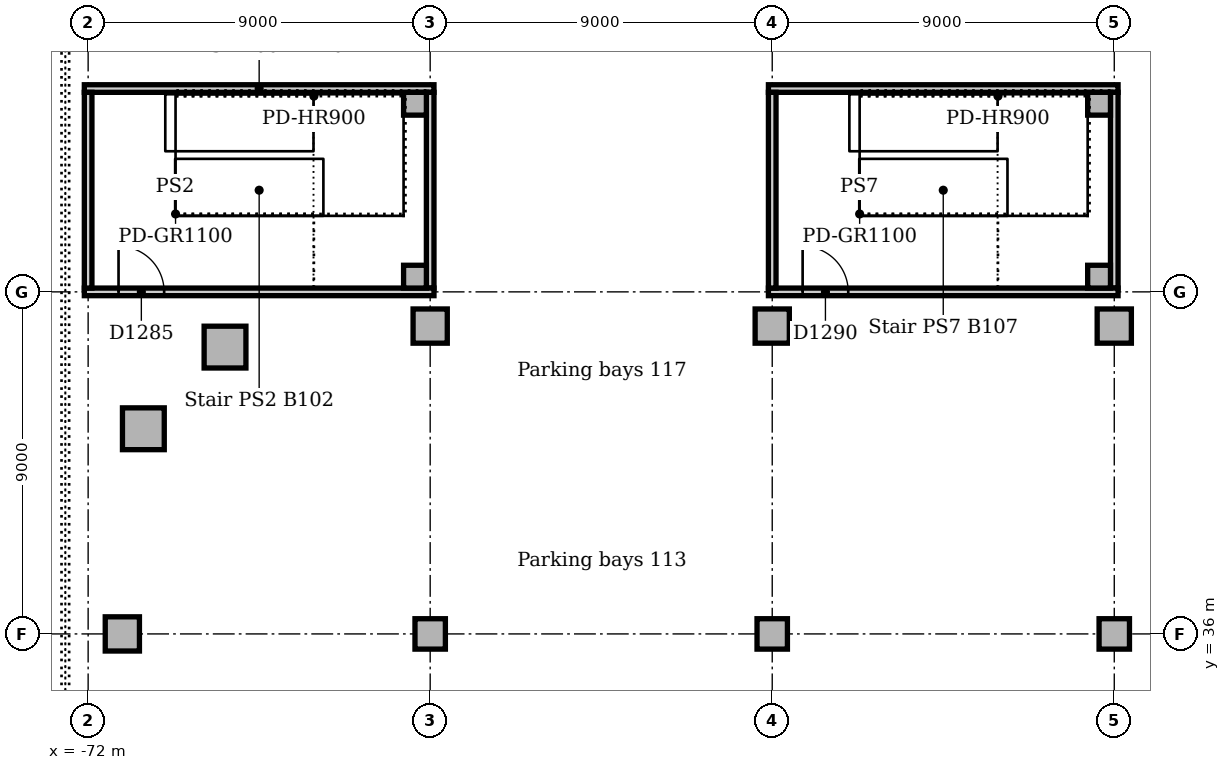
"""IFC4 building model, lengths in metres.
Left out: names, types, materials, properties, quantities, classifications, styles, units other than length and angle.
Written with IfcOpenShell. Run it as: python <this file> out.ifc"""

import sys

from ifc_helpers import new_model, si_unit, direction, frame, frame_2d, origin, origin_2d, place, context, subcontext, project, spatial, rectangle, extrude, element, fill, save


model = new_model("IFC4")
c1 = context("Model", 3, precision=1e-05, world=origin(), true_north=direction((0.0, 1.0)))
c2 = subcontext(c1, "Body", "Model", "MODEL_VIEW")
j1 = project(units=[si_unit("LENGTHUNIT", "METRE"), si_unit("PLANEANGLEUNIT", "RADIAN")], contexts=[c1])
p1 = place(None, origin())
s1 = spatial("IfcSite", under=j1, at=p1, CompositionType="ELEMENT")
p2 = place(p1, origin())
s2 = spatial("IfcBuilding", under=s1, at=p2, CompositionType="ELEMENT")
p3 = place(p2, frame((0.0, 0.0, -5.0)))
s3 = spatial("IfcBuildingStorey", under=s2, at=p3, CompositionType="ELEMENT", Elevation=-5.0)
for number, where, z_axis, x_axis in (
    (1, (-68.398, 43.547, 0.0), (0.0, 0.0, 1.0), (1.0, 0.0, 0.0)),
    (2, (-70.547, 41.398, 0.0), (0.0, 0.0, 1.0), (1.0, 0.0, 0.0)),
):
    element("IfcColumn", number, at=place(p3, frame(where, z_axis=z_axis, x_axis=x_axis)), inside=s3, PredefinedType="COLUMN", context=c2, shape_type="SweptSolid", body=[
        extrude(rectangle(XDim=1.1, YDim=1.1, at=origin_2d()), origin(), (0.0, 0.0, 1.0), 4.7),
    ])
for number, where, z_axis, x_axis in (
    (3, (-63.0, 44.1, 0.0), (0.0, 0.0, 1.0), (1.0, 0.0, 0.0)),
    (4, (-54.0, 44.1, 0.0), (0.0, 0.0, 1.0), (1.0, 0.0, 0.0)),
    (5, (-45.0, 44.1, 0.0), (0.0, 0.0, 1.0), (1.0, 0.0, 0.0)),
    (6, (-71.1, 36.0, 0.0), (0.0, 0.0, 1.0), (1.0, 0.0, 0.0)),
):
    element("IfcColumn", number, at=place(p3, frame(where, z_axis=z_axis, x_axis=x_axis)), inside=s3, PredefinedType="COLUMN", context=c2, shape_type="SweptSolid", body=[
        extrude(rectangle(XDim=0.9, YDim=0.9, at=origin_2d()), origin(), (0.0, 0.0, 1.0), 4.7),
    ])
for number, where, z_axis, x_axis in (
    (7, (-63.0, 36.0, 0.0), (0.0, 0.0, 1.0), (1.0, 0.0, 0.0)),
    (8, (-54.0, 36.0, 0.0), (0.0, 0.0, 1.0), (1.0, 0.0, 0.0)),
    (9, (-45.0, 36.0, 0.0), (0.0, 0.0, 1.0), (1.0, 0.0, 0.0)),
):
    element("IfcColumn", number, at=place(p3, frame(where, z_axis=z_axis, x_axis=x_axis)), inside=s3, PredefinedType="COLUMN", context=c2, shape_type="SweptSolid", body=[
        extrude(rectangle(XDim=0.8, YDim=0.8, at=origin_2d()), origin(), (0.0, 0.0, 1.0), 4.7),
    ])
for number, where, z_axis, x_axis in (
    (10, (-63.4, 49.95, 0.0), (0.0, 0.0, 1.0), (1.0, 0.0, 0.0)),
    (11, (-63.4, 45.4, 0.0), (0.0, 0.0, 1.0), (1.0, 0.0, 0.0)),
    (12, (-45.4, 49.95, 0.0), (0.0, 0.0, 1.0), (1.0, 0.0, 0.0)),
    (13, (-45.4, 45.4, 0.0), (0.0, 0.0, 1.0), (1.0, 0.0, 0.0)),
):
    element("IfcColumn", number, at=place(p3, frame(where, z_axis=z_axis, x_axis=x_axis)), inside=s3, PredefinedType="COLUMN", context=c2, shape_type="SweptSolid", body=[
        extrude(rectangle(XDim=0.6, YDim=0.6, at=origin_2d()), origin(), (0.0, 0.0, 1.0), 5.0),
    ])
p4 = place(p3, frame((-72.1, 50.35, 0.0), z_axis=(0.0, 0.0, 1.0), x_axis=(1.0, 0.0, 0.0)))
e14 = element("IfcWall", 14, at=p4, inside=s3, PredefinedType="SOLIDWALL", context=c2, shape_type="SweptSolid", body=[
    extrude(rectangle(XDim=9.2, YDim=0.2, at=frame_2d((4.6, 0.0))), origin(), (0.0, 0.0, 1.0), 4.7),
])
p5 = place(p3, frame((-63.0, 45.1, 0.0), z_axis=(0.0, 0.0, 1.0), x_axis=(0.0, 1.0, 0.0)))
e15 = element("IfcWall", 15, at=p5, inside=s3, PredefinedType="SOLIDWALL", context=c2, shape_type="SweptSolid", body=[
    extrude(rectangle(XDim=5.15, YDim=0.2, at=frame_2d((2.575, 0.0))), origin(), (0.0, 0.0, 1.0), 4.7),
])
p6 = place(p3, frame((-72.1, 45.0, 0.0), z_axis=(0.0, 0.0, 1.0), x_axis=(1.0, 0.0, 0.0)))
e16 = element("IfcWall", 16, at=p6, inside=s3, PredefinedType="SOLIDWALL", context=c2, shape_type="SweptSolid", body=[
    extrude(rectangle(XDim=9.2, YDim=0.2, at=frame_2d((4.6, 0.0))), origin(), (0.0, 0.0, 1.0), 4.7),
])
p7 = place(p6, frame((0.9, 0.0, 0.0)))
e17 = element("IfcOpeningElement", 17, at=p7, cuts=e16, PredefinedType="OPENING", context=c2, shape_type="SweptSolid", body=[
    extrude(rectangle(XDim=1.2, YDim=2.1, at=frame_2d((0.6, 1.05))), frame((0.0, 0.11, 0.0), z_axis=(0.0, -1.0, 0.0), x_axis=(1.0, 0.0, 0.0)), (0.0, 0.0, 1.0), 0.22),
])
p8 = place(p3, frame((-72.0, 45.1, 0.0), z_axis=(0.0, 0.0, 1.0), x_axis=(0.0, 1.0, 0.0)))
e18 = element("IfcWall", 18, at=p8, inside=s3, PredefinedType="SOLIDWALL", context=c2, shape_type="SweptSolid", body=[
    extrude(rectangle(XDim=5.15, YDim=0.2, at=frame_2d((2.575, 0.0))), origin(), (0.0, 0.0, 1.0), 4.7),
])
p9 = place(p3, frame((-54.1, 50.35, 0.0), z_axis=(0.0, 0.0, 1.0), x_axis=(1.0, 0.0, 0.0)))
e19 = element("IfcWall", 19, at=p9, inside=s3, PredefinedType="SOLIDWALL", context=c2, shape_type="SweptSolid", body=[
    extrude(rectangle(XDim=9.2, YDim=0.2, at=frame_2d((4.6, 0.0))), origin(), (0.0, 0.0, 1.0), 4.7),
])
p10 = place(p3, frame((-45.0, 45.1, 0.0), z_axis=(0.0, 0.0, 1.0), x_axis=(0.0, 1.0, 0.0)))
e20 = element("IfcWall", 20, at=p10, inside=s3, PredefinedType="SOLIDWALL", context=c2, shape_type="SweptSolid", body=[
    extrude(rectangle(XDim=5.15, YDim=0.2, at=frame_2d((2.575, 0.0))), origin(), (0.0, 0.0, 1.0), 4.7),
])
p11 = place(p3, frame((-54.1, 45.0, 0.0), z_axis=(0.0, 0.0, 1.0), x_axis=(1.0, 0.0, 0.0)))
e21 = element("IfcWall", 21, at=p11, inside=s3, PredefinedType="SOLIDWALL", context=c2, shape_type="SweptSolid", body=[
    extrude(rectangle(XDim=9.2, YDim=0.2, at=frame_2d((4.6, 0.0))), origin(), (0.0, 0.0, 1.0), 4.7),
])
p12 = place(p11, frame((0.9, 0.0, 0.0)))
e22 = element("IfcOpeningElement", 22, at=p12, cuts=e21, PredefinedType="OPENING", context=c2, shape_type="SweptSolid", body=[
    extrude(rectangle(XDim=1.2, YDim=2.1, at=frame_2d((0.6, 1.05))), frame((0.0, 0.11, 0.0), z_axis=(0.0, -1.0, 0.0), x_axis=(1.0, 0.0, 0.0)), (0.0, 0.0, 1.0), 0.22),
])
p13 = place(p3, frame((-54.0, 45.1, 0.0), z_axis=(0.0, 0.0, 1.0), x_axis=(0.0, 1.0, 0.0)))
e23 = element("IfcWall", 23, at=p13, inside=s3, PredefinedType="SOLIDWALL", context=c2, shape_type="SweptSolid", body=[
    extrude(rectangle(XDim=5.15, YDim=0.2, at=frame_2d((2.575, 0.0))), origin(), (0.0, 0.0, 1.0), 4.7),
])
p14 = place(p7, origin())
e24 = element("IfcDoor", 24, at=p14, inside=s3, OperationType="SINGLE_SWING_LEFT", PredefinedType="DOOR", context=c2, shape_type="SweptSolid", body=[
    extrude(rectangle(XDim=1.2, YDim=2.1, at=frame_2d((0.6, 1.05))), frame((0.0, 0.025, 0.0), z_axis=(0.0, -1.0, 0.0), x_axis=(1.0, 0.0, 0.0)), (0.0, 0.0, 1.0), 0.05),
])
fill(e17, e24)
p15 = place(p12, origin())
e25 = element("IfcDoor", 25, at=p15, inside=s3, OperationType="SINGLE_SWING_LEFT", PredefinedType="DOOR", context=c2, shape_type="SweptSolid", body=[
    extrude(rectangle(XDim=1.2, YDim=2.1, at=frame_2d((0.6, 1.05))), frame((0.0, 0.025, 0.0), z_axis=(0.0, -1.0, 0.0), x_axis=(1.0, 0.0, 0.0)), (0.0, 0.0, 1.0), 0.05),
])
fill(e22, e25)
save(model, sys.argv[1])
